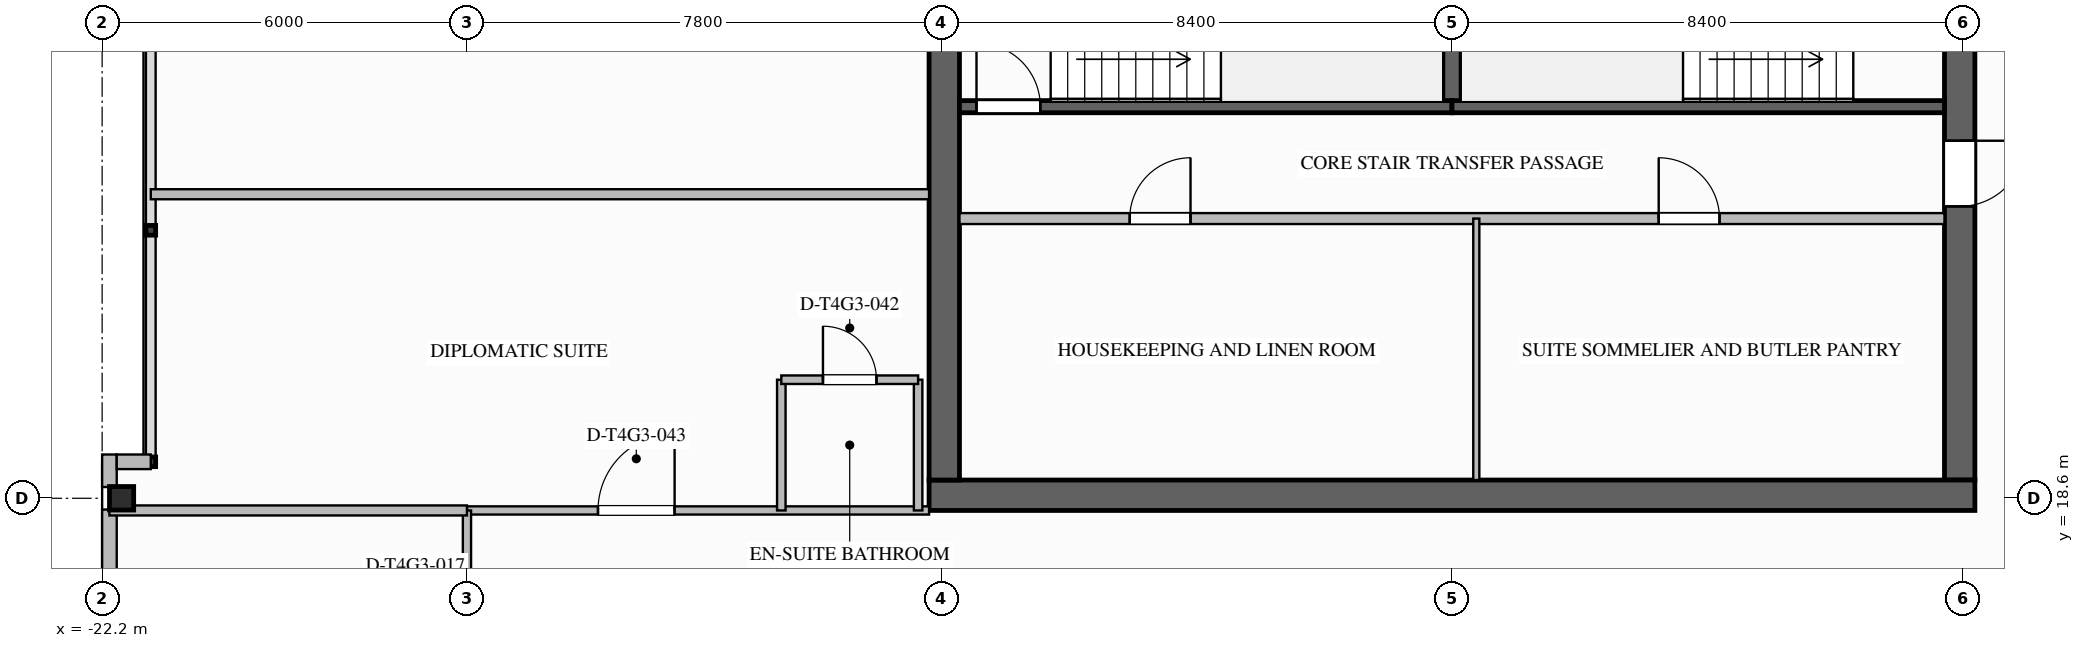
"""IFC4 building model, lengths in metres.
Left out: names, types, materials, properties, quantities, classifications, styles, units other than length and angle.
Written with IfcOpenShell. Run it as: python <this file> out.ifc"""

import sys

from ifc_helpers import new_model, si_unit, direction, frame, frame_2d, origin, origin_2d, place, context, subcontext, project, spatial, rectangle, i_section, extrude, element, fill, save


model = new_model("IFC4")
c1 = context("Model", 3, precision=1e-05, world=origin(), true_north=direction((0.0, 1.0)))
c2 = subcontext(c1, "Body", "Model", "MODEL_VIEW")
j1 = project(units=[si_unit("LENGTHUNIT", "METRE"), si_unit("PLANEANGLEUNIT", "RADIAN")], contexts=[c1])
p1 = place(None, origin())
s1 = spatial("IfcSite", under=j1, at=p1, CompositionType="ELEMENT")
p2 = place(p1, origin())
s2 = spatial("IfcBuilding", under=s1, at=p2, CompositionType="ELEMENT")
p3 = place(p2, frame((0.0, 0.0, 226.7)))
s3 = spatial("IfcBuildingStorey", under=s2, at=p3, CompositionType="ELEMENT", Elevation=226.7)
p4 = place(p3, frame((8.35, 35.1, 0.0), z_axis=(0.0, 0.0, 1.0), x_axis=(0.0, -1.0, 0.0)))
e1 = element("IfcWall", 1, at=p4, inside=s3, PredefinedType="SHEAR", context=c2, shape_type="SweptSolid", body=[
    extrude(rectangle(XDim=16.2, YDim=0.5, at=frame_2d((8.1, 0.0))), origin(), (0.0, 0.0, 1.0), 3.6),
])
p5 = place(p4, frame((3.08, 0.0, 0.0)))
e2 = element("IfcOpeningElement", 2, at=p5, cuts=e1, PredefinedType="OPENING", context=c2, shape_type="SweptSolid", body=[
    extrude(rectangle(XDim=1.12, YDim=2.1, at=frame_2d((0.56, 1.05))), frame((0.0, 0.26, 0.0), z_axis=(0.0, -1.0, 0.0), x_axis=(1.0, 0.0, 0.0)), (0.0, 0.0, 1.0), 0.52),
])
p6 = place(p4, frame((10.62, 0.0, 0.0)))
e3 = element("IfcOpeningElement", 3, at=p6, cuts=e1, PredefinedType="OPENING", context=c2, shape_type="SweptSolid", body=[
    extrude(rectangle(XDim=1.08, YDim=2.04, at=frame_2d((0.54, 1.02))), frame((0.0, 0.26, 0.0), z_axis=(0.0, -1.0, 0.0), x_axis=(1.0, 0.0, 0.0)), (0.0, 0.0, 1.0), 0.52),
])
p7 = place(p3, frame((8.6, 18.65, 0.0), z_axis=(0.0, 0.0, 1.0), x_axis=(-1.0, 0.0, 0.0)))
e4 = element("IfcWall", 4, at=p7, inside=s3, PredefinedType="SHEAR", context=c2, shape_type="SweptSolid", body=[
    extrude(rectangle(XDim=17.2, YDim=0.5, at=frame_2d((8.6, 0.0))), origin(), (0.0, 0.0, 1.0), 3.6),
])
p8 = place(p3, frame((-8.35, 18.9, 0.0), z_axis=(0.0, 0.0, 1.0), x_axis=(0.0, 1.0, 0.0)))
e5 = element("IfcWall", 5, at=p8, inside=s3, PredefinedType="SHEAR", context=c2, shape_type="SweptSolid", body=[
    extrude(rectangle(XDim=16.2, YDim=0.5, at=frame_2d((8.1, 0.0))), origin(), (0.0, 0.0, 1.0), 3.6),
])
p9 = place(p3, frame((-21.88, 18.6, 0.0), z_axis=(0.0, 0.0, 1.0), x_axis=(1.0, 0.0, 0.0)))
e6 = element("IfcColumn", 6, at=p9, inside=s3, PredefinedType="COLUMN", context=c2, shape_type="SweptSolid", body=[
    extrude(i_section(OverallWidth=0.397, OverallDepth=0.387, WebThickness=0.021, FlangeThickness=0.033, FilletRadius=0.025, at=origin_2d()), origin(), (0.0, 0.0, 1.0), 3.597),
])
p10 = place(p3, frame((-22.08, 10.985, 0.0), z_axis=(0.0, 0.0, 1.0), x_axis=(0.0, 1.0, 0.0)))
e7 = element("IfcWall", 7, at=p10, inside=s3, PredefinedType="STANDARD", context=c2, shape_type="SweptSolid", body=[
    extrude(rectangle(XDim=7.429, YDim=0.24, at=frame_2d((3.715, 0.0))), origin(), (0.0, 0.0, 1.0), 2.803),
])
p11 = place(p10, frame((4.615, 0.0, 0.0)))
e8 = element("IfcOpeningElement", 8, at=p11, cuts=e7, PredefinedType="OPENING", context=c2, shape_type="SweptSolid", body=[
    extrude(rectangle(XDim=1.0, YDim=2.2, at=frame_2d((0.5, 1.1))), frame((0.0, 0.13, 0.0), z_axis=(0.0, -1.0, 0.0), x_axis=(1.0, 0.0, 0.0)), (0.0, 0.0, 1.0), 0.26),
])
p12 = place(p10, frame((1.583, 0.0, 0.75)))
e9 = element("IfcOpeningElement", 9, at=p12, cuts=e7, PredefinedType="OPENING", context=c2, shape_type="SweptSolid", body=[
    extrude(rectangle(XDim=1.8, YDim=1.953, at=frame_2d((0.9, 0.977))), frame((0.0, 0.13, 0.0), z_axis=(0.0, -1.0, 0.0), x_axis=(1.0, 0.0, 0.0)), (0.0, 0.0, 1.0), 0.26),
])
p13 = place(p3, frame((-22.08, 18.785, 0.0), z_axis=(0.0, 0.0, 1.0), x_axis=(0.0, 1.0, 0.0)))
e10 = element("IfcWall", 10, at=p13, inside=s3, PredefinedType="STANDARD", context=c2, shape_type="SweptSolid", body=[
    extrude(rectangle(XDim=0.535, YDim=0.24, at=frame_2d((0.267, 0.0))), origin(), (0.0, 0.0, 1.0), 3.34),
])
p14 = place(p3, frame((-21.96, 19.2, 0.0), z_axis=(0.0, 0.0, 1.0), x_axis=(1.0, 0.0, 0.0)))
e11 = element("IfcWall", 11, at=p14, inside=s3, PredefinedType="STANDARD", context=c2, shape_type="SweptSolid", body=[
    extrude(rectangle(XDim=0.56, YDim=0.24, at=frame_2d((0.28, 0.0))), origin(), (0.0, 0.0, 1.0), 3.34),
])
p15 = place(p3, frame((0.0, 25.04, 0.0), z_axis=(0.0, 0.0, 1.0), x_axis=(0.0, 1.0, 0.0)))
e12 = element("IfcWall", 12, at=p15, inside=s3, PredefinedType="SOLIDWALL", context=c2, shape_type="SweptSolid", body=[
    extrude(rectangle(XDim=3.12, YDim=0.3, at=frame_2d((1.56, 0.0))), origin(), (0.0, 0.0, 1.0), 3.34),
])
p16 = place(p3, frame((-8.1, 25.04, 0.0), z_axis=(0.0, 0.0, 1.0), x_axis=(1.0, 0.0, 0.0)))
e13 = element("IfcWall", 13, at=p16, inside=s3, PredefinedType="SOLIDWALL", context=c2, shape_type="SweptSolid", body=[
    extrude(rectangle(XDim=8.1, YDim=0.2, at=frame_2d((4.05, 0.0))), origin(), (0.0, 0.0, 1.0), 3.34),
])
p17 = place(p16, frame((0.28, 0.0, 0.0)))
e14 = element("IfcOpeningElement", 14, at=p17, cuts=e13, PredefinedType="OPENING", context=c2, shape_type="SweptSolid", body=[
    extrude(rectangle(XDim=1.05, YDim=2.1, at=frame_2d((0.525, 1.05))), frame((0.0, 0.11, 0.0), z_axis=(0.0, -1.0, 0.0), x_axis=(1.0, 0.0, 0.0)), (0.0, 0.0, 1.0), 0.22),
])
p18 = place(p3, frame((0.0, 25.04, 0.0), z_axis=(0.0, 0.0, 1.0), x_axis=(1.0, 0.0, 0.0)))
e15 = element("IfcWall", 15, at=p18, inside=s3, PredefinedType="SOLIDWALL", context=c2, shape_type="SweptSolid", body=[
    extrude(rectangle(XDim=8.1, YDim=0.2, at=frame_2d((4.05, 0.0))), origin(), (0.0, 0.0, 1.0), 3.34),
])
p19 = place(p3, frame((-8.1, 23.2, 0.0), z_axis=(0.0, 0.0, 1.0), x_axis=(1.0, 0.0, 0.0)))
e16 = element("IfcWall", 16, at=p19, inside=s3, PredefinedType="SOLIDWALL", context=c2, shape_type="SweptSolid", body=[
    extrude(rectangle(XDim=16.2, YDim=0.18, at=frame_2d((8.1, 0.0))), origin(), (0.0, 0.0, 1.0), 3.34),
])
p20 = place(p19, frame((2.8, 0.0, 0.0)))
e17 = element("IfcOpeningElement", 17, at=p20, cuts=e16, PredefinedType="OPENING", context=c2, shape_type="SweptSolid", body=[
    extrude(rectangle(XDim=1.0, YDim=2.1, at=frame_2d((0.5, 1.05))), frame((0.0, 0.1, 0.0), z_axis=(0.0, -1.0, 0.0), x_axis=(1.0, 0.0, 0.0)), (0.0, 0.0, 1.0), 0.2),
])
p21 = place(p19, frame((11.5, 0.0, 0.0)))
e18 = element("IfcOpeningElement", 18, at=p21, cuts=e16, PredefinedType="OPENING", context=c2, shape_type="SweptSolid", body=[
    extrude(rectangle(XDim=1.0, YDim=2.1, at=frame_2d((0.5, 1.05))), frame((0.0, 0.1, 0.0), z_axis=(0.0, -1.0, 0.0), x_axis=(1.0, 0.0, 0.0)), (0.0, 0.0, 1.0), 0.2),
])
p22 = place(p3, frame((0.4, 18.9, 0.0), z_axis=(0.0, 0.0, 1.0), x_axis=(0.0, 1.0, 0.0)))
e19 = element("IfcWall", 19, at=p22, inside=s3, PredefinedType="PARTITIONING", context=c2, shape_type="SweptSolid", body=[
    extrude(rectangle(XDim=4.3, YDim=0.1, at=frame_2d((2.15, 0.0))), origin(), (0.0, 0.0, 1.0), 3.34),
])
p23 = place(p3, frame((-16.2, 18.4, 0.0), z_axis=(0.0, 0.0, 1.0), x_axis=(1.0, 0.0, 0.0)))
e20 = element("IfcWall", 20, at=p23, inside=s3, PredefinedType="PARTITIONING", context=c2, shape_type="SweptSolid", body=[
    extrude(rectangle(XDim=7.6, YDim=0.135, at=frame_2d((3.8, 0.0))), origin(), (0.0, 0.0, 1.0), 2.718),
])
p24 = place(p23, frame((2.155, 0.0, 0.0)))
e21 = element("IfcOpeningElement", 21, at=p24, cuts=e20, PredefinedType="OPENING", context=c2, shape_type="SweptSolid", body=[
    extrude(rectangle(XDim=1.26, YDim=2.2, at=frame_2d((0.63, 1.1))), frame((0.0, 0.077, 0.0), z_axis=(0.0, -1.0, 0.0), x_axis=(1.0, 0.0, 0.0)), (0.0, 0.0, 1.0), 0.155),
])
p25 = place(p3, frame((-16.2, 15.45, 0.0), z_axis=(0.0, 0.0, 1.0), x_axis=(0.0, 1.0, 0.0)))
e22 = element("IfcWall", 22, at=p25, inside=s3, PredefinedType="PARTITIONING", context=c2, shape_type="SweptSolid", body=[
    extrude(rectangle(XDim=2.95, YDim=0.135, at=frame_2d((1.475, 0.0))), origin(), (0.0, 0.0, 1.0), 2.714),
])
p26 = place(p25, frame((0.52, 0.0, 0.0)))
e23 = element("IfcOpeningElement", 23, at=p26, cuts=e22, PredefinedType="OPENING", context=c2, shape_type="SweptSolid", body=[
    extrude(rectangle(XDim=1.02, YDim=2.15, at=frame_2d((0.51, 1.075))), frame((0.0, 0.077, 0.0), z_axis=(0.0, -1.0, 0.0), x_axis=(1.0, 0.0, 0.0)), (0.0, 0.0, 1.0), 0.155),
])
p27 = place(p3, frame((-22.08, 18.4, 0.0), z_axis=(0.0, 0.0, 1.0), x_axis=(1.0, 0.0, 0.0)))
e24 = element("IfcWall", 24, at=p27, inside=s3, PredefinedType="PARTITIONING", context=c2, shape_type="SweptSolid", body=[
    extrude(rectangle(XDim=5.88, YDim=0.165, at=frame_2d((2.94, 0.0))), origin(), (0.0, 0.0, 1.0), 2.714),
])
p28 = place(p3, frame((-21.4, 23.6, 0.0), z_axis=(0.0, 0.0, 1.0), x_axis=(1.0, 0.0, 0.0)))
e25 = element("IfcWall", 25, at=p28, inside=s3, PredefinedType="PARTITIONING", context=c2, shape_type="SweptSolid", body=[
    extrude(rectangle(XDim=12.8, YDim=0.165, at=frame_2d((6.4, 0.0))), origin(), (0.0, 0.0, 1.0), 3.34),
])
for number, where, z_axis, x_axis in (
    (26, (-11.03, 18.4, 0.0), (0.0, 0.0, 1.0), (0.0, 1.0, 0.0)),
    (27, (-8.78, 18.4, 0.0), (0.0, 0.0, 1.0), (0.0, 1.0, 0.0)),
):
    element("IfcWall", number, at=place(p3, frame(where, z_axis=z_axis, x_axis=x_axis)), inside=s3, PredefinedType="PLUMBINGWALL", context=c2, shape_type="SweptSolid", body=[
        extrude(rectangle(XDim=2.15, YDim=0.14, at=frame_2d((1.075, 0.0))), origin(), (0.0, 0.0, 1.0), 3.34),
    ])
p29 = place(p3, frame((-11.03, 20.55, 0.0), z_axis=(0.0, 0.0, 1.0), x_axis=(1.0, 0.0, 0.0)))
e28 = element("IfcWall", 28, at=p29, inside=s3, PredefinedType="PLUMBINGWALL", context=c2, shape_type="SweptSolid", body=[
    extrude(rectangle(XDim=2.25, YDim=0.14, at=frame_2d((1.125, 0.0))), origin(), (0.0, 0.0, 1.0), 3.34),
])
p30 = place(p29, frame((0.685, 0.0, 0.0)))
e29 = element("IfcOpeningElement", 29, at=p30, cuts=e28, PredefinedType="OPENING", context=c2, shape_type="SweptSolid", body=[
    extrude(rectangle(XDim=0.88, YDim=2.1, at=frame_2d((0.44, 1.05))), frame((0.0, 0.08, 0.0), z_axis=(0.0, -1.0, 0.0), x_axis=(1.0, 0.0, 0.0)), (0.0, 0.0, 1.0), 0.16),
])
p31 = place(p17, origin())
e30 = element("IfcDoor", 30, at=p31, inside=s3, OperationType="SINGLE_SWING_LEFT", PredefinedType="DOOR", context=c2, shape_type="SweptSolid", body=[
    extrude(rectangle(XDim=1.05, YDim=2.1, at=frame_2d((0.525, 1.05))), frame((0.0, 0.025, 0.0), z_axis=(0.0, -1.0, 0.0), x_axis=(1.0, 0.0, 0.0)), (0.0, 0.0, 1.0), 0.05),
])
fill(e14, e30)
p32 = place(p6, origin())
e31 = element("IfcDoor", 31, at=p32, inside=s3, OperationType="SINGLE_SWING_LEFT", PredefinedType="DOOR", context=c2, shape_type="SweptSolid", body=[
    extrude(rectangle(XDim=1.08, YDim=2.04, at=frame_2d((0.54, 1.02))), frame((0.0, 0.025, 0.0), z_axis=(0.0, -1.0, 0.0), x_axis=(1.0, 0.0, 0.0)), (0.0, 0.0, 1.0), 0.05),
])
fill(e3, e31)
p33 = place(p20, origin())
e32 = element("IfcDoor", 32, at=p33, inside=s3, OperationType="SINGLE_SWING_RIGHT", PredefinedType="DOOR", context=c2, shape_type="SweptSolid", body=[
    extrude(rectangle(XDim=1.0, YDim=2.1, at=frame_2d((0.5, 1.05))), frame((0.0, 0.025, 0.0), z_axis=(0.0, -1.0, 0.0), x_axis=(1.0, 0.0, 0.0)), (0.0, 0.0, 1.0), 0.05),
])
fill(e17, e32)
p34 = place(p21, origin())
e33 = element("IfcDoor", 33, at=p34, inside=s3, OperationType="SINGLE_SWING_LEFT", PredefinedType="DOOR", context=c2, shape_type="SweptSolid", body=[
    extrude(rectangle(XDim=1.0, YDim=2.1, at=frame_2d((0.5, 1.05))), frame((0.0, 0.025, 0.0), z_axis=(0.0, -1.0, 0.0), x_axis=(1.0, 0.0, 0.0)), (0.0, 0.0, 1.0), 0.05),
])
fill(e18, e33)
p35 = place(p30, origin())
e34 = element("IfcDoor", 34, at=p35, inside=s3, OperationType="SINGLE_SWING_LEFT", PredefinedType="DOOR", context=c2, shape_type="SweptSolid", body=[
    extrude(rectangle(XDim=0.88, YDim=2.1, at=frame_2d((0.44, 1.05))), frame((0.0, 0.025, 0.0), z_axis=(0.0, -1.0, 0.0), x_axis=(1.0, 0.0, 0.0)), (0.0, 0.0, 1.0), 0.05),
])
fill(e29, e34)
p36 = place(p24, origin())
e35 = element("IfcDoor", 35, at=p36, inside=s3, OperationType="SINGLE_SWING_RIGHT", PredefinedType="DOOR", context=c2, shape_type="SweptSolid", body=[
    extrude(rectangle(XDim=1.26, YDim=2.2, at=frame_2d((0.63, 1.1))), frame((0.0, 0.025, 0.0), z_axis=(0.0, -1.0, 0.0), x_axis=(1.0, 0.0, 0.0)), (0.0, 0.0, 1.0), 0.05),
])
fill(e21, e35)
save(model, sys.argv[1])
